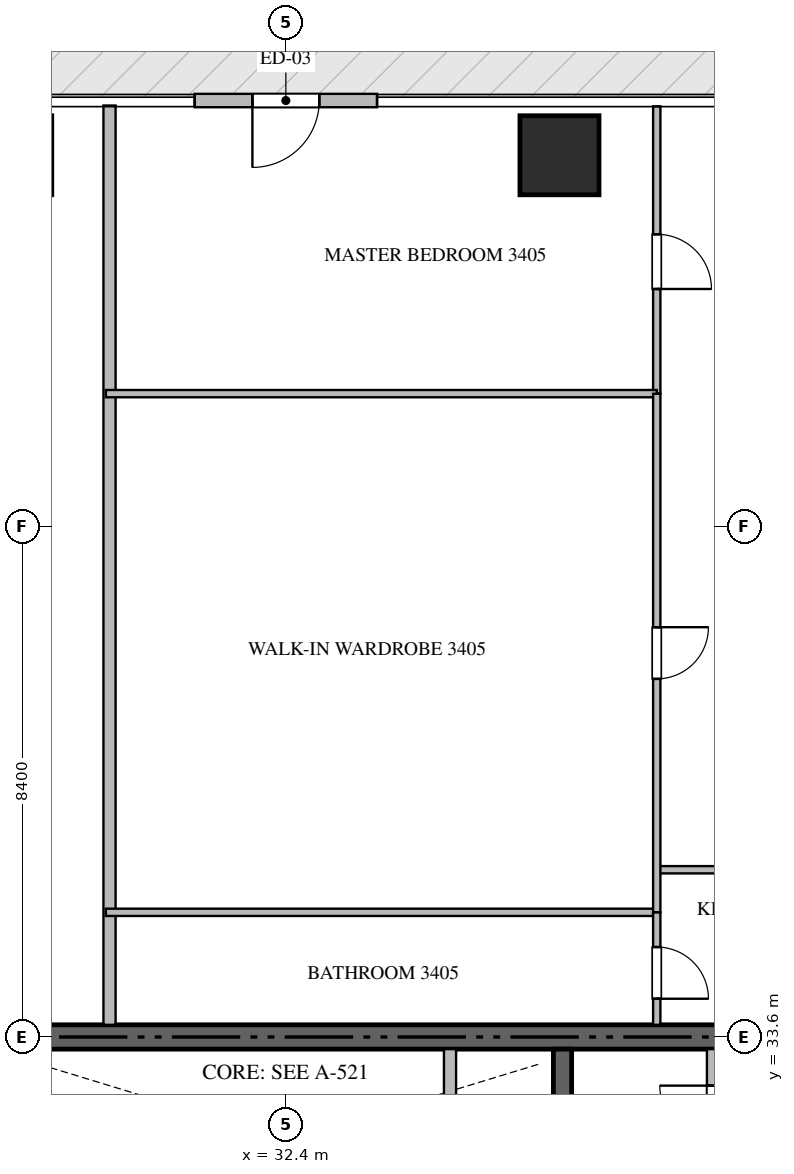
"""IFC4 building model, lengths in metres.
Left out: names, types, materials, properties, quantities, classifications, styles, units other than length and angle.
Written with IfcOpenShell. Run it as: python <this file> out.ifc"""

import sys

from ifc_helpers import new_model, si_unit, direction, frame, frame_2d, origin, origin_2d, place, context, subcontext, project, spatial, rectangle, extrude, source, transform, mapped, element, fill, save


model = new_model("IFC4")
c1 = context("Model", 3, precision=1e-05, world=origin(), true_north=direction((0.0, 1.0)))
c2 = subcontext(c1, "Body", "Model", "MODEL_VIEW")
j1 = project(units=[si_unit("LENGTHUNIT", "METRE"), si_unit("PLANEANGLEUNIT", "RADIAN")], contexts=[c1])
p1 = place(None, origin())
s1 = spatial("IfcSite", under=j1, at=p1, CompositionType="ELEMENT")
p2 = place(p1, origin())
s2 = spatial("IfcBuilding", under=s1, at=p2, CompositionType="ELEMENT")
p3 = place(p2, frame((0.0, 0.0, 138.9)))
s3 = spatial("IfcBuildingStorey", under=s2, at=p3, CompositionType="ELEMENT", Elevation=138.9)
p4 = place(p3, frame((41.4, 33.6, -0.26), z_axis=(0.0, 0.0, 1.0), x_axis=(-1.0, 0.0, 0.0)))
e1 = element("IfcWall", 1, at=p4, inside=s3, PredefinedType="SHEAR", context=c2, shape_type="SweptSolid", body=[
    extrude(rectangle(XDim=18.0, YDim=0.4, at=frame_2d((9.0, 0.0))), origin(), (0.0, 0.0, 1.0), 3.748),
])
p5 = place(p3, frame((36.95, 27.05, -0.26), z_axis=(0.0, 0.0, 1.0), x_axis=(0.0, 1.0, 0.0)))
e2 = element("IfcWall", 2, at=p5, inside=s3, PredefinedType="SHEAR", context=c2, shape_type="SweptSolid", body=[
    extrude(rectangle(XDim=6.35, YDim=0.3, at=frame_2d((3.175, 0.0))), origin(), (0.0, 0.0, 1.0), 3.748),
])
m1 = source(origin(), c2, "Body", "SweptSolid", [
    extrude(rectangle(XDim=1.3, YDim=1.3, at=origin_2d()), origin(), (0.0, 0.0, 1.0), 3.75),
])
p6 = place(p3, frame((36.9, 48.1, -0.26), z_axis=(0.0, 0.0, 1.0), x_axis=(1.0, 0.0, 0.0)))
e3 = element("IfcColumn", 3, at=p6, inside=s3, PredefinedType="COLUMN", context=c2, shape_type="MappedRepresentation", body=[
    mapped(m1, transform((0.0, 0.0, 0.0), scale=1.0)),
])
p7 = place(p3, frame((33.9, 49.0, 0.0), z_axis=(0.0, 0.0, 1.0), x_axis=(-1.0, 0.0, 0.0)))
e4 = element("IfcWall", 4, at=p7, inside=s3, PredefinedType="ELEMENTEDWALL", context=c2, shape_type="SweptSolid", body=[
    extrude(rectangle(XDim=3.0, YDim=0.22, at=frame_2d((1.5, 0.0))), origin(), (0.0, 0.0, 1.0), 3.475),
])
p8 = place(p7, frame((0.95, 0.0, 0.0)))
e5 = element("IfcOpeningElement", 5, at=p8, cuts=e4, PredefinedType="OPENING", context=c2, shape_type="SweptSolid", body=[
    extrude(rectangle(XDim=1.1, YDim=2.2, at=frame_2d((0.55, 1.1))), frame((0.0, 0.12, 0.0), z_axis=(0.0, -1.0, 0.0), x_axis=(1.0, 0.0, 0.0)), (0.0, 0.0, 1.0), 0.24),
])
p9 = place(p3, frame((35.1, 30.75, 0.0), z_axis=(0.0, 0.0, 1.0), x_axis=(0.0, 1.0, 0.0)))
e6 = element("IfcWall", 6, at=p9, inside=s3, PredefinedType="STANDARD", context=c2, shape_type="SweptSolid", body=[
    extrude(rectangle(XDim=2.65, YDim=0.2, at=frame_2d((1.325, 0.0))), origin(), (0.0, 0.0, 1.0), 3.49),
])
p10 = place(p3, frame((39.4, 31.35, 0.0), z_axis=(0.0, 0.0, 1.0), x_axis=(0.0, 1.0, 0.0)))
e7 = element("IfcWall", 7, at=p10, inside=s3, PredefinedType="PARTITIONING", context=c2, shape_type="SweptSolid", body=[
    extrude(rectangle(XDim=2.05, YDim=0.15, at=frame_2d((1.025, 0.0))), origin(), (0.0, 0.0, 1.0), 3.49),
])
p11 = place(p10, frame((0.6, 0.0, 0.0)))
e8 = element("IfcOpeningElement", 8, at=p11, cuts=e7, PredefinedType="OPENING", context=c2, shape_type="SweptSolid", body=[
    extrude(rectangle(XDim=0.85, YDim=2.1, at=frame_2d((0.425, 1.05))), frame((0.0, 0.085, 0.0), z_axis=(0.0, -1.0, 0.0), x_axis=(1.0, 0.0, 0.0)), (0.0, 0.0, 1.0), 0.17),
])
p12 = place(p3, frame((29.5, 33.8, 0.0), z_axis=(0.0, 0.0, 1.0), x_axis=(0.0, 1.0, 0.0)))
e9 = element("IfcWall", 9, at=p12, inside=s3, PredefinedType="PARTITIONING", context=c2, shape_type="SweptSolid", body=[
    extrude(rectangle(XDim=15.118, YDim=0.2, at=frame_2d((7.559, 0.0))), origin(), (0.0, 0.0, 1.0), 3.49),
])
p13 = place(p3, frame((38.5, 36.35, 0.0), z_axis=(0.0, 0.0, 1.0), x_axis=(1.0, 0.0, 0.0)))
e10 = element("IfcWall", 10, at=p13, inside=s3, PredefinedType="PARTITIONING", context=c2, shape_type="SweptSolid", body=[
    extrude(rectangle(XDim=2.85, YDim=0.12, at=frame_2d((1.425, 0.0))), origin(), (0.0, 0.0, 1.0), 3.49),
])
p14 = place(p13, frame((1.0, 0.0, 0.0)))
e11 = element("IfcOpeningElement", 11, at=p14, cuts=e10, PredefinedType="OPENING", context=c2, shape_type="SweptSolid", body=[
    extrude(rectangle(XDim=0.85, YDim=2.1, at=frame_2d((0.425, 1.05))), frame((0.0, 0.07, 0.0), z_axis=(0.0, -1.0, 0.0), x_axis=(1.0, 0.0, 0.0)), (0.0, 0.0, 1.0), 0.14),
])
p15 = place(p3, frame((38.5, 48.905, 0.0), z_axis=(0.0, 0.0, 1.0), x_axis=(0.0, -1.0, 0.0)))
e12 = element("IfcWall", 12, at=p15, inside=s3, PredefinedType="PARTITIONING", context=c2, shape_type="SweptSolid", body=[
    extrude(rectangle(XDim=4.725, YDim=0.12, at=frame_2d((2.363, 0.0))), origin(), (0.0, 0.0, 1.0), 3.49),
])
p16 = place(p15, frame((2.104, 0.0, 0.0)))
e13 = element("IfcOpeningElement", 13, at=p16, cuts=e12, PredefinedType="OPENING", context=c2, shape_type="SweptSolid", body=[
    extrude(rectangle(XDim=0.9, YDim=2.1, at=frame_2d((0.45, 1.05))), frame((0.0, 0.07, 0.0), z_axis=(0.0, -1.0, 0.0), x_axis=(1.0, 0.0, 0.0)), (0.0, 0.0, 1.0), 0.14),
])
for number, where, z_axis, x_axis in (
    (14, (29.44, 44.18, 0.0), (0.0, 0.0, 1.0), (1.0, 0.0, 0.0)),
    (15, (29.44, 35.65, 0.0), (0.0, 0.0, 1.0), (1.0, 0.0, 0.0)),
):
    element("IfcWall", number, at=place(p3, frame(where, z_axis=z_axis, x_axis=x_axis)), inside=s3, PredefinedType="PARTITIONING", context=c2, shape_type="SweptSolid", body=[
        extrude(rectangle(XDim=9.06, YDim=0.12, at=frame_2d((4.53, 0.0))), origin(), (0.0, 0.0, 1.0), 3.49),
    ])
p17 = place(p3, frame((38.5, 44.178, 0.0), z_axis=(0.0, 0.0, 1.0), x_axis=(0.0, -1.0, 0.0)))
e16 = element("IfcWall", 16, at=p17, inside=s3, PredefinedType="PARTITIONING", context=c2, shape_type="SweptSolid", body=[
    extrude(rectangle(XDim=8.528, YDim=0.12, at=frame_2d((4.264, 0.0))), origin(), (0.0, 0.0, 1.0), 3.49),
])
p18 = place(p17, frame((3.839, 0.0, 0.0)))
e17 = element("IfcOpeningElement", 17, at=p18, cuts=e16, PredefinedType="OPENING", context=c2, shape_type="SweptSolid", body=[
    extrude(rectangle(XDim=0.85, YDim=2.1, at=frame_2d((0.425, 1.05))), frame((0.0, 0.07, 0.0), z_axis=(0.0, -1.0, 0.0), x_axis=(1.0, 0.0, 0.0)), (0.0, 0.0, 1.0), 0.14),
])
p19 = place(p3, frame((38.5, 35.648, 0.0), z_axis=(0.0, 0.0, 1.0), x_axis=(0.0, -1.0, 0.0)))
e18 = element("IfcWall", 18, at=p19, inside=s3, PredefinedType="PARTITIONING", context=c2, shape_type="SweptSolid", body=[
    extrude(rectangle(XDim=1.848, YDim=0.12, at=frame_2d((0.924, 0.0))), origin(), (0.0, 0.0, 1.0), 3.49),
])
p20 = place(p19, frame((0.569, 0.0, 0.0)))
e19 = element("IfcOpeningElement", 19, at=p20, cuts=e18, PredefinedType="OPENING", context=c2, shape_type="SweptSolid", body=[
    extrude(rectangle(XDim=0.85, YDim=2.1, at=frame_2d((0.425, 1.05))), frame((0.0, 0.07, 0.0), z_axis=(0.0, -1.0, 0.0), x_axis=(1.0, 0.0, 0.0)), (0.0, 0.0, 1.0), 0.14),
])
m2 = source(origin(), c2, "Body", "SweptSolid", [
    extrude(rectangle(XDim=1.1, YDim=2.2, at=frame_2d((0.55, 1.1))), frame((0.0, 0.025, 0.0), z_axis=(0.0, -1.0, 0.0), x_axis=(1.0, 0.0, 0.0)), (0.0, 0.0, 1.0), 0.05),
])
p21 = place(p8, origin())
e20 = element("IfcDoor", 20, at=p21, inside=s3, OperationType="SINGLE_SWING_RIGHT", PredefinedType="DOOR", context=c2, shape_type="MappedRepresentation", body=[
    mapped(m2, transform((0.0, 0.0, 0.0), scale=1.0)),
])
fill(e5, e20)
m3 = source(origin(), c2, "Body", "SweptSolid", [
    extrude(rectangle(XDim=0.85, YDim=2.1, at=frame_2d((0.425, 1.05))), frame((0.0, 0.025, 0.0), z_axis=(0.0, -1.0, 0.0), x_axis=(1.0, 0.0, 0.0)), (0.0, 0.0, 1.0), 0.05),
])
p22 = place(p11, origin())
e21 = element("IfcDoor", 21, at=p22, inside=s3, OperationType="SINGLE_SWING_RIGHT", PredefinedType="DOOR", context=c2, shape_type="MappedRepresentation", body=[
    mapped(m3, transform((0.0, 0.0, 0.0), scale=1.0)),
])
fill(e8, e21)
m4 = source(origin(), c2, "Body", "SweptSolid", [
    extrude(rectangle(XDim=0.9, YDim=2.1, at=frame_2d((0.45, 1.05))), frame((0.0, 0.025, 0.0), z_axis=(0.0, -1.0, 0.0), x_axis=(1.0, 0.0, 0.0)), (0.0, 0.0, 1.0), 0.05),
])
p23 = place(p16, origin())
e22 = element("IfcDoor", 22, at=p23, inside=s3, OperationType="SINGLE_SWING_RIGHT", PredefinedType="DOOR", context=c2, shape_type="MappedRepresentation", body=[
    mapped(m4, transform((0.0, 0.0, 0.0), scale=1.0)),
])
fill(e13, e22)
p24 = place(p18, origin())
e23 = element("IfcDoor", 23, at=p24, inside=s3, OperationType="SINGLE_SWING_LEFT", PredefinedType="DOOR", context=c2, shape_type="MappedRepresentation", body=[
    mapped(m3, transform((0.0, 0.0, 0.0), scale=1.0)),
])
fill(e17, e23)
p25 = place(p20, origin())
e24 = element("IfcDoor", 24, at=p25, inside=s3, OperationType="SINGLE_SWING_RIGHT", PredefinedType="DOOR", context=c2, shape_type="MappedRepresentation", body=[
    mapped(m3, transform((0.0, 0.0, 0.0), scale=1.0)),
])
fill(e19, e24)
save(model, sys.argv[1])
